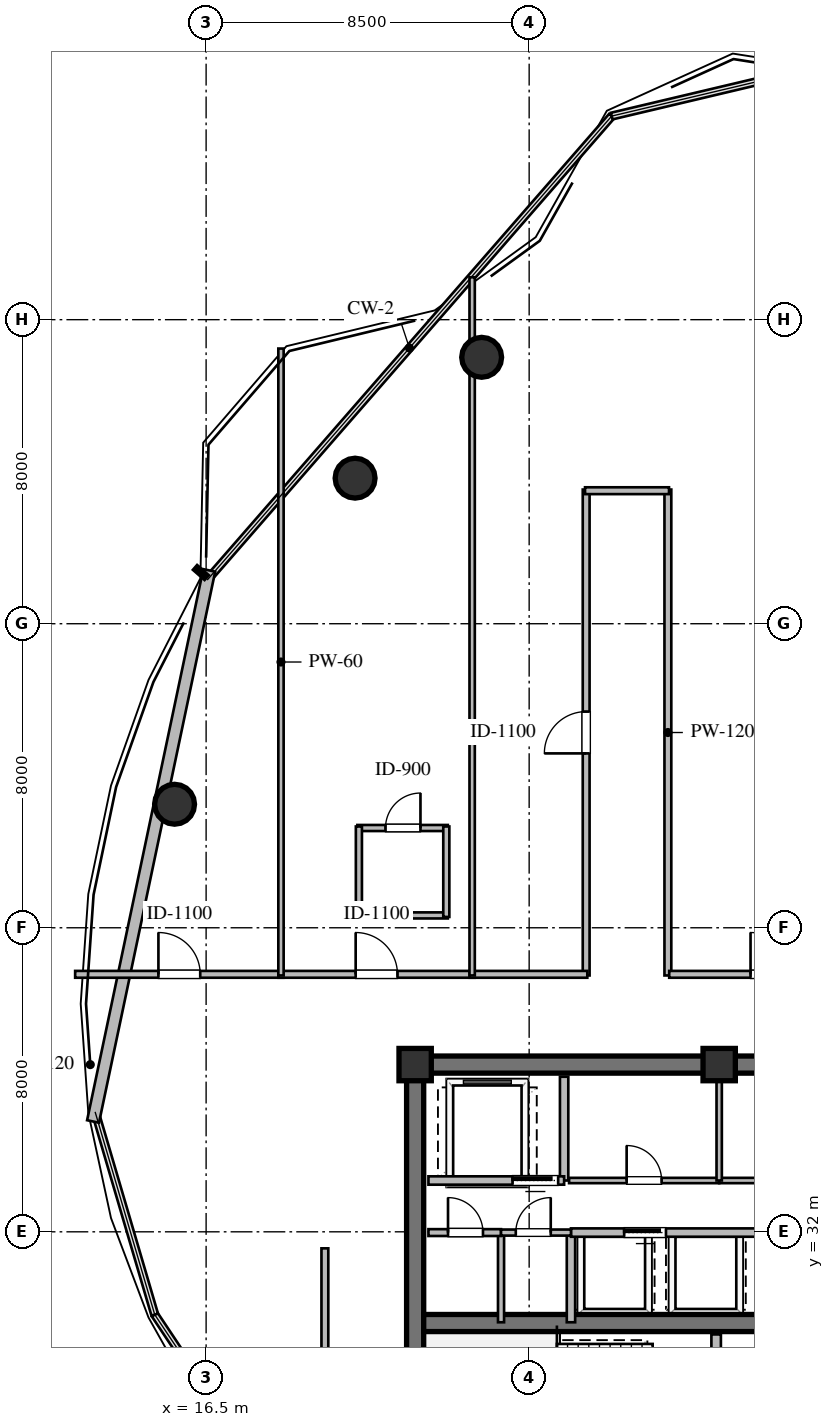
"""IFC4 building model, lengths in metres.
Left out: names, types, materials, properties, quantities, classifications, styles, units other than length and angle.
Written with IfcOpenShell. Run it as: python <this file> out.ifc"""

import sys

from ifc_helpers import new_model, si_unit, direction, frame, frame_2d, origin, origin_2d, place, context, subcontext, project, spatial, rectangle, circle, extrude, element, fill, save


model = new_model("IFC4")
c1 = context("Model", 3, precision=1e-05, world=origin(), true_north=direction((0.0, 1.0)))
c2 = subcontext(c1, "Body", "Model", "MODEL_VIEW")
j1 = project(units=[si_unit("LENGTHUNIT", "METRE"), si_unit("PLANEANGLEUNIT", "RADIAN")], contexts=[c1])
p1 = place(None, origin())
s1 = spatial("IfcSite", under=j1, at=p1, CompositionType="ELEMENT")
p2 = place(p1, origin())
s2 = spatial("IfcBuilding", under=s1, at=p2, CompositionType="ELEMENT")
p3 = place(p2, frame((0.0, 0.0, 213.6)))
s3 = spatial("IfcBuildingStorey", under=s2, at=p3, CompositionType="ELEMENT", Elevation=213.6)
p4 = place(p3, frame((21.775, 36.4, 0.0), z_axis=(0.0, 0.0, 1.0), x_axis=(1.0, 0.0, 0.0)))
e1 = element("IfcWall", 1, at=p4, inside=s3, PredefinedType="SHEAR", context=c2, shape_type="SweptSolid", body=[
    extrude(rectangle(XDim=22.45, YDim=0.45, at=frame_2d((11.225, 0.0))), origin(), (0.0, 0.0, 1.0), 3.36),
])
p5 = place(p3, frame((22.0, 23.825, 0.0), z_axis=(0.0, 0.0, 1.0), x_axis=(0.0, 1.0, 0.0)))
e2 = element("IfcWall", 2, at=p5, inside=s3, PredefinedType="SHEAR", context=c2, shape_type="SweptSolid", body=[
    extrude(rectangle(XDim=12.35, YDim=0.45, at=frame_2d((6.175, 0.0))), origin(), (0.0, 0.0, 1.0), 3.36),
])
p6 = place(p3, frame((22.225, 29.6, 0.0), z_axis=(0.0, 0.0, 1.0), x_axis=(1.0, 0.0, 0.0)))
e3 = element("IfcWall", 3, at=p6, inside=s3, PredefinedType="SHEAR", context=c2, shape_type="SweptSolid", body=[
    extrude(rectangle(XDim=21.55, YDim=0.45, at=frame_2d((10.775, 0.0))), origin(), (0.0, 0.0, 1.0), 3.36),
])
p7 = place(p6, frame((12.225, 0.0, 0.0)))
e4 = element("IfcOpeningElement", 4, at=p7, cuts=e3, PredefinedType="OPENING", context=c2, shape_type="SweptSolid", body=[
    extrude(rectangle(XDim=1.15, YDim=2.1, at=frame_2d((0.575, 1.05))), frame((0.0, 0.235, 0.0), z_axis=(0.0, -1.0, 0.0), x_axis=(1.0, 0.0, 0.0)), (0.0, 0.0, 1.0), 0.47),
])
for number, where, z_axis, x_axis in (
    (5, (30.0, 36.4, 0.0), (0.0, 0.0, 1.0), (1.0, 0.0, 0.0)),
    (6, (22.0, 36.4, 0.0), (0.0, 0.0, 1.0), (1.0, 0.0, 0.0)),
):
    element("IfcColumn", number, at=place(p3, frame(where, z_axis=z_axis, x_axis=x_axis)), inside=s3, PredefinedType="COLUMN", context=c2, shape_type="SweptSolid", body=[
        extrude(rectangle(XDim=0.85, YDim=0.85, at=origin_2d()), origin(), (0.0, 0.0, 1.0), 3.6),
    ])
for number, where, z_axis, x_axis in (
    (7, (23.75, 55.01, 0.0), (0.0, 0.0, 1.0), (1.0, 0.0, 0.0)),
    (8, (20.42, 51.83, 0.0), (0.0, 0.0, 1.0), (1.0, 0.0, 0.0)),
    (9, (15.67, 43.25, 0.0), (0.0, 0.0, 1.0), (1.0, 0.0, 0.0)),
):
    element("IfcColumn", number, at=place(p3, frame(where, z_axis=z_axis, x_axis=x_axis)), inside=s3, PredefinedType="COLUMN", context=c2, shape_type="SweptSolid", body=[
        extrude(circle(Radius=0.525, at=origin_2d()), origin(), (0.0, 0.0, 1.0), 3.6),
    ])
p8 = place(p3, frame((13.525, 34.903, 0.0), z_axis=(0.0, 0.0, 1.0), x_axis=(0.206301080321, 0.978488561128, 0.0)))
e10 = element("IfcWall", 10, at=p8, inside=s3, PredefinedType="STANDARD", context=c2, shape_type="SweptSolid", body=[
    extrude(rectangle(XDim=14.819, YDim=0.32, at=frame_2d((7.409, 0.0))), origin(), (0.0, 0.0, 1.0), 2.806),
])
p9 = place(p3, frame((29.92, 23.9, 0.0), z_axis=(0.0, 0.0, 1.0), x_axis=(0.0, 1.0, 0.0)))
e11 = element("IfcWall", 11, at=p9, inside=s3, PredefinedType="SOLIDWALL", context=c2, shape_type="SweptSolid", body=[
    extrude(rectangle(XDim=5.4, YDim=0.25, at=frame_2d((2.7, 0.0))), origin(), (0.0, 0.0, 1.0), 3.36),
])
p10 = place(p9, frame((3.421, 0.0, 0.0)))
e12 = element("IfcOpeningElement", 12, at=p10, cuts=e11, PredefinedType="OPENING", context=c2, shape_type="SweptSolid", body=[
    extrude(rectangle(XDim=1.15, YDim=2.1, at=frame_2d((0.575, 1.05))), frame((0.0, 0.135, 0.0), z_axis=(0.0, -1.0, 0.0), x_axis=(1.0, 0.0, 0.0)), (0.0, 0.0, 1.0), 0.27),
])
p11 = place(p3, frame((25.92, 33.35, 0.0), z_axis=(0.0, 0.0, 1.0), x_axis=(0.0, 1.0, 0.0)))
e13 = element("IfcWall", 13, at=p11, inside=s3, PredefinedType="SOLIDWALL", context=c2, shape_type="SweptSolid", body=[
    extrude(rectangle(XDim=2.73, YDim=0.22, at=frame_2d((1.365, 0.0))), origin(), (0.0, 0.0, 1.0), 3.36),
])
p12 = place(p3, frame((22.35, 33.35, 0.0), z_axis=(0.0, 0.0, 1.0), x_axis=(1.0, 0.0, 0.0)))
e14 = element("IfcWall", 14, at=p12, inside=s3, PredefinedType="SOLIDWALL", context=c2, shape_type="SweptSolid", body=[
    extrude(rectangle(XDim=3.57, YDim=0.22, at=frame_2d((1.785, 0.0))), origin(), (0.0, 0.0, 1.0), 3.36),
])
p13 = place(p12, frame((2.213, 0.0, 0.0)))
e15 = element("IfcOpeningElement", 15, at=p13, cuts=e14, PredefinedType="OPENING", context=c2, shape_type="SweptSolid", body=[
    extrude(rectangle(XDim=1.2, YDim=2.1, at=frame_2d((0.6, 1.05))), frame((0.0, 0.12, 0.0), z_axis=(0.0, -1.0, 0.0), x_axis=(1.0, 0.0, 0.0)), (0.0, 0.0, 1.0), 0.24),
])
p14 = place(p3, frame((26.1, 29.62, 0.0), z_axis=(0.0, 0.0, 1.0), x_axis=(0.0, 1.0, 0.0)))
e16 = element("IfcWall", 16, at=p14, inside=s3, PredefinedType="SOLIDWALL", context=c2, shape_type="SweptSolid", body=[
    extrude(rectangle(XDim=2.36, YDim=0.22, at=frame_2d((1.18, 0.0))), origin(), (0.0, 0.0, 1.0), 3.36),
])
p15 = place(p3, frame((26.1, 31.98, 0.0), z_axis=(0.0, 0.0, 1.0), x_axis=(1.0, 0.0, 0.0)))
e17 = element("IfcWall", 17, at=p15, inside=s3, PredefinedType="SOLIDWALL", context=c2, shape_type="SweptSolid", body=[
    extrude(rectangle(XDim=7.8, YDim=0.22, at=frame_2d((3.9, 0.0))), origin(), (0.0, 0.0, 1.0), 3.36),
])
p16 = place(p15, frame((1.4, 0.0, 0.0)))
e18 = element("IfcOpeningElement", 18, at=p16, cuts=e17, PredefinedType="OPENING", context=c2, shape_type="SweptSolid", body=[
    extrude(rectangle(XDim=1.1, YDim=2.1, at=frame_2d((0.55, 1.05))), frame((0.0, 0.12, 0.0), z_axis=(0.0, -1.0, 0.0), x_axis=(1.0, 0.0, 0.0)), (0.0, 0.0, 1.0), 0.24),
])
p17 = place(p15, frame((5.066, 0.0, 0.0)))
e19 = element("IfcOpeningElement", 19, at=p17, cuts=e17, PredefinedType="OPENING", context=c2, shape_type="SweptSolid", body=[
    extrude(rectangle(XDim=1.1, YDim=2.1, at=frame_2d((0.55, 1.05))), frame((0.0, 0.12, 0.0), z_axis=(0.0, -1.0, 0.0), x_axis=(1.0, 0.0, 0.0)), (0.0, 0.0, 1.0), 0.24),
])
p18 = place(p3, frame((26.05, 33.35, 0.0), z_axis=(0.0, 0.0, 1.0), x_axis=(1.0, 0.0, 0.0)))
e20 = element("IfcWall", 20, at=p18, inside=s3, PredefinedType="PARTITIONING", context=c2, shape_type="SweptSolid", body=[
    extrude(rectangle(XDim=3.95, YDim=0.14, at=frame_2d((1.975, 0.0))), origin(), (0.0, 0.0, 1.0), 3.36),
])
p19 = place(p18, frame((1.515, 0.0, 0.0)))
e21 = element("IfcOpeningElement", 21, at=p19, cuts=e20, PredefinedType="OPENING", context=c2, shape_type="SweptSolid", body=[
    extrude(rectangle(XDim=0.92, YDim=2.1, at=frame_2d((0.46, 1.05))), frame((0.0, 0.08, 0.0), z_axis=(0.0, -1.0, 0.0), x_axis=(1.0, 0.0, 0.0)), (0.0, 0.0, 1.0), 0.16),
])
p20 = place(p3, frame((30.0, 33.35, 0.0), z_axis=(0.0, 0.0, 1.0), x_axis=(1.0, 0.0, 0.0)))
e22 = element("IfcWall", 22, at=p20, inside=s3, PredefinedType="PARTITIONING", context=c2, shape_type="SweptSolid", body=[
    extrude(rectangle(XDim=3.92, YDim=0.14, at=frame_2d((1.96, 0.0))), origin(), (0.0, 0.0, 1.0), 3.36),
])
p21 = place(p20, frame((1.5, 0.0, 0.0)))
e23 = element("IfcOpeningElement", 23, at=p21, cuts=e22, PredefinedType="OPENING", context=c2, shape_type="SweptSolid", body=[
    extrude(rectangle(XDim=0.92, YDim=2.1, at=frame_2d((0.46, 1.05))), frame((0.0, 0.08, 0.0), z_axis=(0.0, -1.0, 0.0), x_axis=(1.0, 0.0, 0.0)), (0.0, 0.0, 1.0), 0.16),
])
p22 = place(p3, frame((30.0, 33.35, 0.0), z_axis=(0.0, 0.0, 1.0), x_axis=(0.0, 1.0, 0.0)))
e24 = element("IfcWall", 24, at=p22, inside=s3, PredefinedType="PARTITIONING", context=c2, shape_type="SweptSolid", body=[
    extrude(rectangle(XDim=2.75, YDim=0.14, at=frame_2d((1.375, 0.0))), origin(), (0.0, 0.0, 1.0), 3.36),
])
p23 = place(p3, frame((24.26, 29.62, 0.0), z_axis=(0.0, 0.0, 1.0), x_axis=(0.0, 1.0, 0.0)))
e25 = element("IfcWall", 25, at=p23, inside=s3, PredefinedType="PLUMBINGWALL", context=c2, shape_type="SweptSolid", body=[
    extrude(rectangle(XDim=2.36, YDim=0.16, at=frame_2d((1.18, 0.0))), origin(), (0.0, 0.0, 1.0), 3.36),
])
p24 = place(p3, frame((22.35, 31.98, 0.0), z_axis=(0.0, 0.0, 1.0), x_axis=(1.0, 0.0, 0.0)))
e26 = element("IfcWall", 26, at=p24, inside=s3, PredefinedType="PARTITIONING", context=c2, shape_type="SweptSolid", body=[
    extrude(rectangle(XDim=1.91, YDim=0.18, at=frame_2d((0.955, 0.0))), origin(), (0.0, 0.0, 1.0), 3.36),
])
p25 = place(p24, frame((0.515, 0.0, 0.0)))
e27 = element("IfcOpeningElement", 27, at=p25, cuts=e26, PredefinedType="OPENING", context=c2, shape_type="SweptSolid", body=[
    extrude(rectangle(XDim=0.92, YDim=2.1, at=frame_2d((0.46, 1.05))), frame((0.0, 0.1, 0.0), z_axis=(0.0, -1.0, 0.0), x_axis=(1.0, 0.0, 0.0)), (0.0, 0.0, 1.0), 0.2),
])
p26 = place(p3, frame((24.26, 31.98, 0.0), z_axis=(0.0, 0.0, 1.0), x_axis=(1.0, 0.0, 0.0)))
e28 = element("IfcWall", 28, at=p26, inside=s3, PredefinedType="PLUMBINGWALL", context=c2, shape_type="SweptSolid", body=[
    extrude(rectangle(XDim=1.84, YDim=0.16, at=frame_2d((0.92, 0.0))), origin(), (0.0, 0.0, 1.0), 3.36),
])
p27 = place(p26, frame((0.388, 0.0, 0.0)))
e29 = element("IfcOpeningElement", 29, at=p27, cuts=e28, PredefinedType="OPENING", context=c2, shape_type="SweptSolid", body=[
    extrude(rectangle(XDim=0.92, YDim=2.1, at=frame_2d((0.46, 1.05))), frame((0.0, 0.09, 0.0), z_axis=(0.0, -1.0, 0.0), x_axis=(1.0, 0.0, 0.0)), (0.0, 0.0, 1.0), 0.18),
])
p28 = place(p3, frame((20.48, 40.325, 0.0), z_axis=(0.0, 0.0, 1.0), x_axis=(1.0, 0.0, 0.0)))
e30 = element("IfcWall", 30, at=p28, inside=s3, PredefinedType="PLUMBINGWALL", context=c2, shape_type="SweptSolid", body=[
    extrude(rectangle(XDim=2.38, YDim=0.16, at=frame_2d((1.19, 0.0))), origin(), (0.0, 0.0, 1.0), 3.36),
])
p29 = place(p3, frame((20.48, 42.625, 0.0), z_axis=(0.0, 0.0, 1.0), x_axis=(1.0, 0.0, 0.0)))
e31 = element("IfcWall", 31, at=p29, inside=s3, PredefinedType="PLUMBINGWALL", context=c2, shape_type="SweptSolid", body=[
    extrude(rectangle(XDim=2.38, YDim=0.16, at=frame_2d((1.19, 0.0))), origin(), (0.0, 0.0, 1.0), 3.36),
])
p30 = place(p29, frame((0.74, 0.0, 0.0)))
e32 = element("IfcOpeningElement", 32, at=p30, cuts=e31, PredefinedType="OPENING", context=c2, shape_type="SweptSolid", body=[
    extrude(rectangle(XDim=0.92, YDim=2.1, at=frame_2d((0.46, 1.05))), frame((0.0, 0.09, 0.0), z_axis=(0.0, -1.0, 0.0), x_axis=(1.0, 0.0, 0.0)), (0.0, 0.0, 1.0), 0.18),
])
p31 = place(p3, frame((20.52, 40.285, 0.0), z_axis=(0.0, 0.0, 1.0), x_axis=(0.0, 1.0, 0.0)))
e33 = element("IfcWall", 33, at=p31, inside=s3, PredefinedType="PLUMBINGWALL", context=c2, shape_type="SweptSolid", body=[
    extrude(rectangle(XDim=2.38, YDim=0.16, at=frame_2d((1.19, 0.0))), origin(), (0.0, 0.0, 1.0), 3.36),
])
p32 = place(p3, frame((22.82, 40.285, 0.0), z_axis=(0.0, 0.0, 1.0), x_axis=(0.0, 1.0, 0.0)))
e34 = element("IfcWall", 34, at=p32, inside=s3, PredefinedType="PLUMBINGWALL", context=c2, shape_type="SweptSolid", body=[
    extrude(rectangle(XDim=2.38, YDim=0.16, at=frame_2d((1.19, 0.0))), origin(), (0.0, 0.0, 1.0), 2.806),
])
p33 = place(p3, frame((13.054, 38.775, 0.0), z_axis=(0.0, 0.0, 1.0), x_axis=(1.0, 0.0, 0.0)))
e35 = element("IfcWall", 35, at=p33, inside=s3, PredefinedType="PARTITIONING", context=c2, shape_type="SweptSolid", body=[
    extrude(rectangle(XDim=5.481, YDim=0.18, at=frame_2d((2.74, 0.0))), origin(), (0.0, 0.0, 1.0), 3.36),
])
p34 = place(p33, frame((2.191, 0.0, 0.0)))
e36 = element("IfcOpeningElement", 36, at=p34, cuts=e35, PredefinedType="OPENING", context=c2, shape_type="SweptSolid", body=[
    extrude(rectangle(XDim=1.1, YDim=2.1, at=frame_2d((0.55, 1.05))), frame((0.0, 0.1, 0.0), z_axis=(0.0, -1.0, 0.0), x_axis=(1.0, 0.0, 0.0)), (0.0, 0.0, 1.0), 0.2),
])
p35 = place(p3, frame((18.405, 38.775, 0.0), z_axis=(0.0, 0.0, 1.0), x_axis=(1.0, 0.0, 0.0)))
e37 = element("IfcWall", 37, at=p35, inside=s3, PredefinedType="PARTITIONING", context=c2, shape_type="SweptSolid", body=[
    extrude(rectangle(XDim=5.16, YDim=0.18, at=frame_2d((2.58, 0.0))), origin(), (0.0, 0.0, 1.0), 3.36),
])
p36 = place(p35, frame((2.03, 0.0, 0.0)))
e38 = element("IfcOpeningElement", 38, at=p36, cuts=e37, PredefinedType="OPENING", context=c2, shape_type="SweptSolid", body=[
    extrude(rectangle(XDim=1.1, YDim=2.1, at=frame_2d((0.55, 1.05))), frame((0.0, 0.1, 0.0), z_axis=(0.0, -1.0, 0.0), x_axis=(1.0, 0.0, 0.0)), (0.0, 0.0, 1.0), 0.2),
])
p37 = place(p3, frame((26.5, 38.745, 0.0), z_axis=(0.0, 0.0, 1.0), x_axis=(0.0, 1.0, 0.0)))
e39 = element("IfcWall", 39, at=p37, inside=s3, PredefinedType="PARTITIONING", context=c2, shape_type="SweptSolid", body=[
    extrude(rectangle(XDim=12.785, YDim=0.18, at=frame_2d((6.393, 0.0))), origin(), (0.0, 0.0, 1.0), 3.36),
])
p38 = place(p37, frame((5.843, 0.0, 0.0)))
e40 = element("IfcOpeningElement", 40, at=p38, cuts=e39, PredefinedType="OPENING", context=c2, shape_type="SweptSolid", body=[
    extrude(rectangle(XDim=1.1, YDim=2.1, at=frame_2d((0.55, 1.05))), frame((0.0, 0.1, 0.0), z_axis=(0.0, -1.0, 0.0), x_axis=(1.0, 0.0, 0.0)), (0.0, 0.0, 1.0), 0.2),
])
p39 = place(p3, frame((28.65, 51.53, 0.0), z_axis=(0.0, 0.0, 1.0), x_axis=(0.0, -1.0, 0.0)))
e41 = element("IfcWall", 41, at=p39, inside=s3, PredefinedType="PARTITIONING", context=c2, shape_type="SweptSolid", body=[
    extrude(rectangle(XDim=12.785, YDim=0.18, at=frame_2d((6.393, 0.0))), origin(), (0.0, 0.0, 1.0), 3.36),
])
p40 = place(p3, frame((23.435, 38.775, 0.0), z_axis=(0.0, 0.0, 1.0), x_axis=(1.0, 0.0, 0.0)))
e42 = element("IfcWall", 42, at=p40, inside=s3, PredefinedType="PARTITIONING", context=c2, shape_type="SweptSolid", body=[
    extrude(rectangle(XDim=3.095, YDim=0.18, at=frame_2d((1.547, 0.0))), origin(), (0.0, 0.0, 1.0), 3.36),
])
p41 = place(p3, frame((26.47, 51.5, 0.0), z_axis=(0.0, 0.0, 1.0), x_axis=(1.0, 0.0, 0.0)))
e43 = element("IfcWall", 43, at=p41, inside=s3, PredefinedType="PARTITIONING", context=c2, shape_type="SweptSolid", body=[
    extrude(rectangle(XDim=2.21, YDim=0.18, at=frame_2d((1.105, 0.0))), origin(), (0.0, 0.0, 1.0), 3.36),
])
p42 = place(p3, frame((28.685, 38.775, 0.0), z_axis=(0.0, 0.0, 1.0), x_axis=(1.0, 0.0, 0.0)))
e44 = element("IfcWall", 44, at=p42, inside=s3, PredefinedType="PARTITIONING", context=c2, shape_type="SweptSolid", body=[
    extrude(rectangle(XDim=5.38, YDim=0.18, at=frame_2d((2.69, 0.0))), origin(), (0.0, 0.0, 1.0), 3.36),
])
p43 = place(p42, frame((2.14, 0.0, 0.0)))
e45 = element("IfcOpeningElement", 45, at=p43, cuts=e44, PredefinedType="OPENING", context=c2, shape_type="SweptSolid", body=[
    extrude(rectangle(XDim=1.1, YDim=2.1, at=frame_2d((0.55, 1.05))), frame((0.0, 0.1, 0.0), z_axis=(0.0, -1.0, 0.0), x_axis=(1.0, 0.0, 0.0)), (0.0, 0.0, 1.0), 0.2),
])
p44 = place(p3, frame((19.625, 24.06, 0.0), z_axis=(0.0, 0.0, 1.0), x_axis=(0.0, 1.0, 0.0)))
e46 = element("IfcWall", 46, at=p44, inside=s3, PredefinedType="PARTITIONING", context=c2, shape_type="SweptSolid", body=[
    extrude(rectangle(XDim=7.505, YDim=0.18, at=frame_2d((3.752, 0.0))), origin(), (0.0, 0.0, 1.0), 2.817),
])
p45 = place(p44, frame((3.64, 0.0, 0.0)))
e47 = element("IfcOpeningElement", 47, at=p45, cuts=e46, PredefinedType="OPENING", context=c2, shape_type="SweptSolid", body=[
    extrude(rectangle(XDim=1.1, YDim=2.1, at=frame_2d((0.55, 1.05))), frame((0.0, 0.1, 0.0), z_axis=(0.0, -1.0, 0.0), x_axis=(1.0, 0.0, 0.0)), (0.0, 0.0, 1.0), 0.2),
])
p46 = place(p3, frame((18.47, 55.24, 0.0), z_axis=(0.0, 0.0, 1.0), x_axis=(0.0, -1.0, 0.0)))
e48 = element("IfcWall", 48, at=p46, inside=s3, PredefinedType="PARTITIONING", context=c2, shape_type="SweptSolid", body=[
    extrude(rectangle(XDim=16.495, YDim=0.14, at=frame_2d((8.248, 0.0))), origin(), (0.0, 0.0, 1.0), 3.36),
])
p47 = place(p3, frame((23.5, 57.116, 0.0), z_axis=(0.0, 0.0, 1.0), x_axis=(0.0, -1.0, 0.0)))
e49 = element("IfcWall", 49, at=p47, inside=s3, PredefinedType="PARTITIONING", context=c2, shape_type="SweptSolid", body=[
    extrude(rectangle(XDim=18.371, YDim=0.14, at=frame_2d((9.186, 0.0))), origin(), (0.0, 0.0, 1.0), 2.806),
])
p48 = place(p13, origin())
e50 = element("IfcDoor", 50, at=p48, inside=s3, OperationType="SLIDING_TO_LEFT", PredefinedType="DOOR", context=c2, shape_type="SweptSolid", body=[
    extrude(rectangle(XDim=1.2, YDim=2.1, at=frame_2d((0.6, 1.05))), frame((0.0, 0.025, 0.0), z_axis=(0.0, -1.0, 0.0), x_axis=(1.0, 0.0, 0.0)), (0.0, 0.0, 1.0), 0.05),
])
fill(e15, e50)
p49 = place(p16, origin())
e51 = element("IfcDoor", 51, at=p49, inside=s3, OperationType="SLIDING_TO_LEFT", PredefinedType="DOOR", context=c2, shape_type="SweptSolid", body=[
    extrude(rectangle(XDim=1.1, YDim=2.1, at=frame_2d((0.55, 1.05))), frame((0.0, 0.025, 0.0), z_axis=(0.0, -1.0, 0.0), x_axis=(1.0, 0.0, 0.0)), (0.0, 0.0, 1.0), 0.05),
])
fill(e18, e51)
p50 = place(p19, origin())
e52 = element("IfcDoor", 52, at=p50, inside=s3, OperationType="SINGLE_SWING_LEFT", PredefinedType="DOOR", context=c2, shape_type="SweptSolid", body=[
    extrude(rectangle(XDim=0.92, YDim=2.1, at=frame_2d((0.46, 1.05))), frame((0.0, 0.025, 0.0), z_axis=(0.0, -1.0, 0.0), x_axis=(1.0, 0.0, 0.0)), (0.0, 0.0, 1.0), 0.05),
])
fill(e21, e52)
p51 = place(p25, origin())
e53 = element("IfcDoor", 53, at=p51, inside=s3, OperationType="SINGLE_SWING_LEFT", PredefinedType="DOOR", context=c2, shape_type="SweptSolid", body=[
    extrude(rectangle(XDim=0.92, YDim=2.1, at=frame_2d((0.46, 1.05))), frame((0.0, 0.025, 0.0), z_axis=(0.0, -1.0, 0.0), x_axis=(1.0, 0.0, 0.0)), (0.0, 0.0, 1.0), 0.05),
])
fill(e27, e53)
p52 = place(p27, origin())
e54 = element("IfcDoor", 54, at=p52, inside=s3, OperationType="SINGLE_SWING_RIGHT", PredefinedType="DOOR", context=c2, shape_type="SweptSolid", body=[
    extrude(rectangle(XDim=0.92, YDim=2.1, at=frame_2d((0.46, 1.05))), frame((0.0, 0.025, 0.0), z_axis=(0.0, -1.0, 0.0), x_axis=(1.0, 0.0, 0.0)), (0.0, 0.0, 1.0), 0.05),
])
fill(e29, e54)
p53 = place(p30, origin())
e55 = element("IfcDoor", 55, at=p53, inside=s3, OperationType="SINGLE_SWING_RIGHT", PredefinedType="DOOR", context=c2, shape_type="SweptSolid", body=[
    extrude(rectangle(XDim=0.92, YDim=2.1, at=frame_2d((0.46, 1.05))), frame((0.0, 0.025, 0.0), z_axis=(0.0, -1.0, 0.0), x_axis=(1.0, 0.0, 0.0)), (0.0, 0.0, 1.0), 0.05),
])
fill(e32, e55)
p54 = place(p34, origin())
e56 = element("IfcDoor", 56, at=p54, inside=s3, OperationType="SINGLE_SWING_LEFT", PredefinedType="DOOR", context=c2, shape_type="SweptSolid", body=[
    extrude(rectangle(XDim=1.1, YDim=2.1, at=frame_2d((0.55, 1.05))), frame((0.0, 0.025, 0.0), z_axis=(0.0, -1.0, 0.0), x_axis=(1.0, 0.0, 0.0)), (0.0, 0.0, 1.0), 0.05),
])
fill(e36, e56)
p55 = place(p36, origin())
e57 = element("IfcDoor", 57, at=p55, inside=s3, OperationType="SINGLE_SWING_LEFT", PredefinedType="DOOR", context=c2, shape_type="SweptSolid", body=[
    extrude(rectangle(XDim=1.1, YDim=2.1, at=frame_2d((0.55, 1.05))), frame((0.0, 0.025, 0.0), z_axis=(0.0, -1.0, 0.0), x_axis=(1.0, 0.0, 0.0)), (0.0, 0.0, 1.0), 0.05),
])
fill(e38, e57)
p56 = place(p38, origin())
e58 = element("IfcDoor", 58, at=p56, inside=s3, OperationType="SINGLE_SWING_LEFT", PredefinedType="DOOR", context=c2, shape_type="SweptSolid", body=[
    extrude(rectangle(XDim=1.1, YDim=2.1, at=frame_2d((0.55, 1.05))), frame((0.0, 0.025, 0.0), z_axis=(0.0, -1.0, 0.0), x_axis=(1.0, 0.0, 0.0)), (0.0, 0.0, 1.0), 0.05),
])
fill(e40, e58)
p57 = place(p43, origin())
e59 = element("IfcDoor", 59, at=p57, inside=s3, OperationType="SINGLE_SWING_LEFT", PredefinedType="DOOR", context=c2, shape_type="SweptSolid", body=[
    extrude(rectangle(XDim=1.1, YDim=2.1, at=frame_2d((0.55, 1.05))), frame((0.0, 0.025, 0.0), z_axis=(0.0, -1.0, 0.0), x_axis=(1.0, 0.0, 0.0)), (0.0, 0.0, 1.0), 0.05),
])
fill(e45, e59)
save(model, sys.argv[1])
